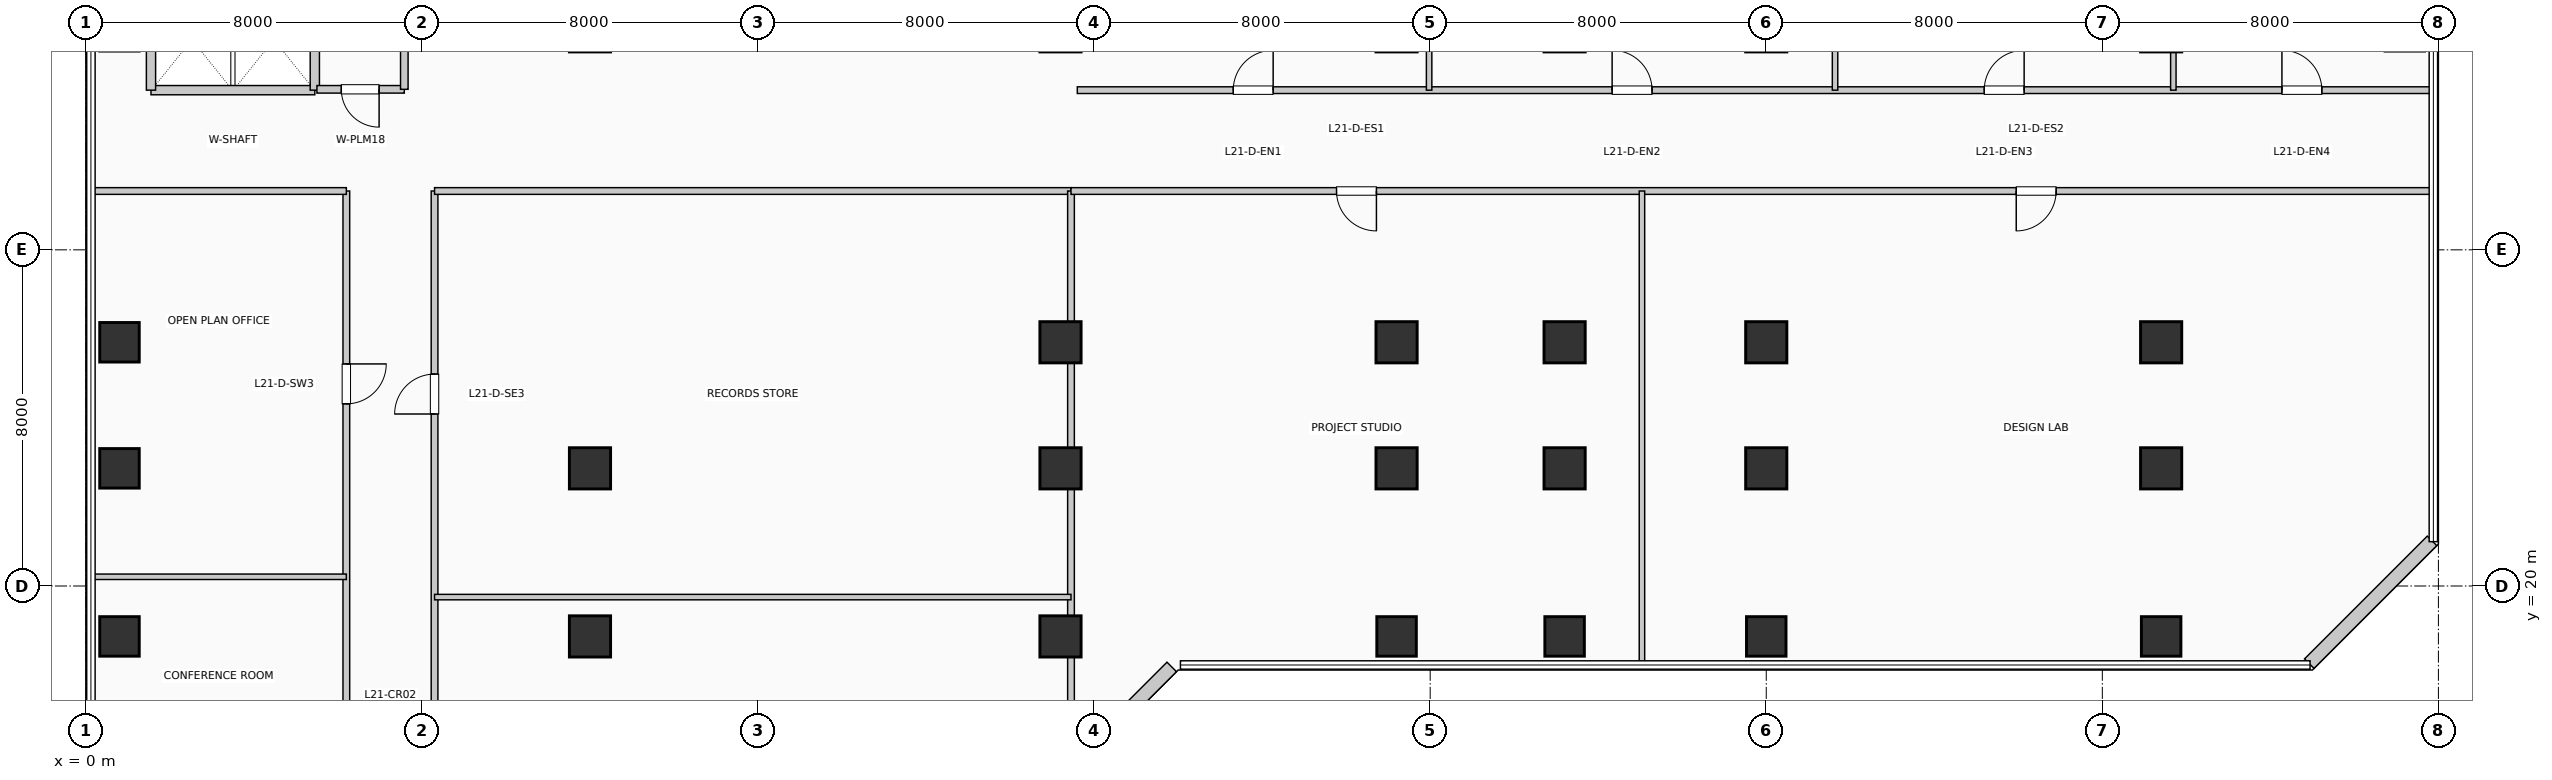
"""IFC4 building model, lengths in metres.
Left out: names, types, materials, properties, quantities, classifications, styles, units other than length and angle.
Written with IfcOpenShell. Run it as: python <this file> out.ifc"""

import sys

from ifc_helpers import new_model, si_unit, direction, frame, frame_2d, origin, origin_2d, place, context, subcontext, project, spatial, rectangle, extrude, element, fill, save


model = new_model("IFC4")
c1 = context("Model", 3, precision=1e-05, world=origin(), true_north=direction((0.0, 1.0)))
c2 = subcontext(c1, "Body", "Model", "MODEL_VIEW")
j1 = project(units=[si_unit("LENGTHUNIT", "METRE"), si_unit("PLANEANGLEUNIT", "RADIAN")], contexts=[c1])
p1 = place(None, origin())
s1 = spatial("IfcSite", under=j1, at=p1, CompositionType="ELEMENT")
p2 = place(p1, origin())
s2 = spatial("IfcBuilding", under=s1, at=p2, CompositionType="ELEMENT")
p3 = place(p2, frame((0.0, 0.0, 89.76)))
s3 = spatial("IfcBuildingStorey", under=s2, at=p3, CompositionType="ELEMENT", Elevation=89.76)
for number, where, z_axis, x_axis in (
    (1, (0.8, 18.8, 0.0), (0.0, 0.0, 1.0), (1.0, 0.0, 0.0)),
    (2, (0.8, 22.8, 0.0), (0.0, 0.0, 1.0), (1.0, 0.0, 0.0)),
    (3, (0.8, 25.8, 0.0), (0.0, 0.0, 1.0), (1.0, 0.0, 0.0)),
):
    element("IfcColumn", number, at=place(p3, frame(where, z_axis=z_axis, x_axis=x_axis)), inside=s3, PredefinedType="COLUMN", context=c2, shape_type="SweptSolid", body=[
        extrude(rectangle(XDim=0.94, YDim=0.94, at=origin_2d()), origin(), (0.0, 0.0, 1.0), 3.96),
    ])
for number, where, z_axis, x_axis in (
    (4, (12.0, 18.8, 0.0), (0.0, 0.0, 1.0), (1.0, 0.0, 0.0)),
    (5, (12.0, 22.8, 0.0), (0.0, 0.0, 1.0), (1.0, 0.0, 0.0)),
    (6, (23.2, 18.8, 0.0), (0.0, 0.0, 1.0), (1.0, 0.0, 0.0)),
    (7, (23.2, 22.8, 0.0), (0.0, 0.0, 1.0), (1.0, 0.0, 0.0)),
    (8, (23.2, 25.8, 0.0), (0.0, 0.0, 1.0), (1.0, 0.0, 0.0)),
):
    element("IfcColumn", number, at=place(p3, frame(where, z_axis=z_axis, x_axis=x_axis)), inside=s3, PredefinedType="COLUMN", context=c2, shape_type="SweptSolid", body=[
        extrude(rectangle(XDim=0.98, YDim=0.98, at=origin_2d()), origin(), (0.0, 0.0, 1.0), 3.96),
    ])
p4 = place(p3, frame((31.2, 18.8, 0.0), z_axis=(0.0, 0.0, 1.0), x_axis=(1.0, 0.0, 0.0)))
e9 = element("IfcColumn", 9, at=p4, inside=s3, PredefinedType="COLUMN", context=c2, shape_type="SweptSolid", body=[
    extrude(rectangle(XDim=0.94, YDim=0.94, at=origin_2d()), origin(), (0.0, 0.0, 1.0), 3.96),
])
for number, where, z_axis, x_axis in (
    (10, (31.2, 22.8, 0.0), (0.0, 0.0, 1.0), (1.0, 0.0, 0.0)),
    (11, (31.2, 25.8, 0.0), (0.0, 0.0, 1.0), (1.0, 0.0, 0.0)),
):
    element("IfcColumn", number, at=place(p3, frame(where, z_axis=z_axis, x_axis=x_axis)), inside=s3, PredefinedType="COLUMN", context=c2, shape_type="SweptSolid", body=[
        extrude(rectangle(XDim=0.98, YDim=0.98, at=origin_2d()), origin(), (0.0, 0.0, 1.0), 3.96),
    ])
p5 = place(p3, frame((35.2, 18.8, 0.0), z_axis=(0.0, 0.0, 1.0), x_axis=(1.0, 0.0, 0.0)))
e12 = element("IfcColumn", 12, at=p5, inside=s3, PredefinedType="COLUMN", context=c2, shape_type="SweptSolid", body=[
    extrude(rectangle(XDim=0.94, YDim=0.94, at=origin_2d()), origin(), (0.0, 0.0, 1.0), 3.96),
])
for number, where, z_axis, x_axis in (
    (13, (35.2, 22.8, 0.0), (0.0, 0.0, 1.0), (1.0, 0.0, 0.0)),
    (14, (35.2, 25.8, 0.0), (0.0, 0.0, 1.0), (1.0, 0.0, 0.0)),
):
    element("IfcColumn", number, at=place(p3, frame(where, z_axis=z_axis, x_axis=x_axis)), inside=s3, PredefinedType="COLUMN", context=c2, shape_type="SweptSolid", body=[
        extrude(rectangle(XDim=0.98, YDim=0.98, at=origin_2d()), origin(), (0.0, 0.0, 1.0), 3.96),
    ])
p6 = place(p3, frame((40.0, 18.8, 0.0), z_axis=(0.0, 0.0, 1.0), x_axis=(1.0, 0.0, 0.0)))
e15 = element("IfcColumn", 15, at=p6, inside=s3, PredefinedType="COLUMN", context=c2, shape_type="SweptSolid", body=[
    extrude(rectangle(XDim=0.94, YDim=0.94, at=origin_2d()), origin(), (0.0, 0.0, 1.0), 3.96),
])
for number, where, z_axis, x_axis in (
    (16, (40.0, 22.8, 0.0), (0.0, 0.0, 1.0), (1.0, 0.0, 0.0)),
    (17, (40.0, 25.8, 0.0), (0.0, 0.0, 1.0), (1.0, 0.0, 0.0)),
):
    element("IfcColumn", number, at=place(p3, frame(where, z_axis=z_axis, x_axis=x_axis)), inside=s3, PredefinedType="COLUMN", context=c2, shape_type="SweptSolid", body=[
        extrude(rectangle(XDim=0.98, YDim=0.98, at=origin_2d()), origin(), (0.0, 0.0, 1.0), 3.96),
    ])
p7 = place(p3, frame((49.4, 18.8, 0.0), z_axis=(0.0, 0.0, 1.0), x_axis=(1.0, 0.0, 0.0)))
e18 = element("IfcColumn", 18, at=p7, inside=s3, PredefinedType="COLUMN", context=c2, shape_type="SweptSolid", body=[
    extrude(rectangle(XDim=0.94, YDim=0.94, at=origin_2d()), origin(), (0.0, 0.0, 1.0), 3.96),
])
for number, where, z_axis, x_axis in (
    (19, (49.4, 22.8, 0.0), (0.0, 0.0, 1.0), (1.0, 0.0, 0.0)),
    (20, (49.4, 25.8, 0.0), (0.0, 0.0, 1.0), (1.0, 0.0, 0.0)),
):
    element("IfcColumn", number, at=place(p3, frame(where, z_axis=z_axis, x_axis=x_axis)), inside=s3, PredefinedType="COLUMN", context=c2, shape_type="SweptSolid", body=[
        extrude(rectangle(XDim=0.98, YDim=0.98, at=origin_2d()), origin(), (0.0, 0.0, 1.0), 3.96),
    ])
p8 = place(p3, frame((23.926, 16.152, 0.0), z_axis=(0.0, 0.0, 1.0), x_axis=(0.707106781187, 0.707106781187, 0.0)))
e21 = element("IfcWall", 21, at=p8, inside=s3, PredefinedType="SOLIDWALL", context=c2, shape_type="SweptSolid", body=[
    extrude(rectangle(XDim=2.718, YDim=0.32, at=frame_2d((1.359, 0.0))), origin(), (0.0, 0.0, 1.0), 3.61),
])
p9 = place(p3, frame((52.926, 18.152, 0.0), z_axis=(0.0, 0.0, 1.0), x_axis=(0.707106781187, 0.707106781187, 0.0)))
e22 = element("IfcWall", 22, at=p9, inside=s3, PredefinedType="SOLIDWALL", context=c2, shape_type="SweptSolid", body=[
    extrude(rectangle(XDim=4.133, YDim=0.32, at=frame_2d((2.066, 0.0))), origin(), (0.0, 0.0, 1.0), 3.61),
])
p10 = place(p3, frame((1.55, 31.8, 0.0), z_axis=(0.0, 0.0, 1.0), x_axis=(1.0, 0.0, 0.0)))
e23 = element("IfcWall", 23, at=p10, inside=s3, PredefinedType="PARTITIONING", context=c2, shape_type="SweptSolid", body=[
    extrude(rectangle(XDim=3.9, YDim=0.22, at=frame_2d((1.95, 0.0))), origin(), (0.0, 0.0, 1.0), 3.61),
])
for number, where, z_axis, x_axis in (
    (24, (1.55, 31.8, 0.0), (0.0, 0.0, 1.0), (0.0, 1.0, 0.0)),
    (25, (5.45, 31.8, 0.0), (0.0, 0.0, 1.0), (0.0, 1.0, 0.0)),
):
    element("IfcWall", number, at=place(p3, frame(where, z_axis=z_axis, x_axis=x_axis)), inside=s3, PredefinedType="PARTITIONING", context=c2, shape_type="SweptSolid", body=[
        extrude(rectangle(XDim=2.38, YDim=0.22, at=frame_2d((1.19, 0.0))), origin(), (0.0, 0.0, 1.0), 3.61),
    ])
p11 = place(p3, frame((5.5, 31.82, 0.0), z_axis=(0.0, 0.0, 1.0), x_axis=(1.0, 0.0, 0.0)))
e26 = element("IfcWall", 26, at=p11, inside=s3, PredefinedType="PLUMBINGWALL", context=c2, shape_type="SweptSolid", body=[
    extrude(rectangle(XDim=2.08, YDim=0.18, at=frame_2d((1.04, 0.0))), origin(), (0.0, 0.0, 1.0), 3.61),
])
p12 = place(p11, frame((1.48, 0.0, 0.0), z_axis=(0.0, 0.0, 1.0), x_axis=(-1.0, 0.0, 0.0)))
e27 = element("IfcOpeningElement", 27, at=p12, cuts=e26, PredefinedType="OPENING", context=c2, shape_type="SweptSolid", body=[
    extrude(rectangle(XDim=0.9, YDim=2.1, at=frame_2d((0.45, 1.05))), frame((0.0, 0.1, 0.0), z_axis=(0.0, -1.0, 0.0), x_axis=(1.0, 0.0, 0.0)), (0.0, 0.0, 1.0), 0.2),
])
p13 = place(p3, frame((7.58, 31.82, 0.0), z_axis=(0.0, 0.0, 1.0), x_axis=(0.0, 1.0, 0.0)))
e28 = element("IfcWall", 28, at=p13, inside=s3, PredefinedType="PLUMBINGWALL", context=c2, shape_type="SweptSolid", body=[
    extrude(rectangle(XDim=2.36, YDim=0.18, at=frame_2d((1.18, 0.0))), origin(), (0.0, 0.0, 1.0), 3.61),
])
p14 = place(p3, frame((6.2, 5.24, 0.0), z_axis=(0.0, 0.0, 1.0), x_axis=(0.0, 1.0, 0.0)))
e29 = element("IfcWall", 29, at=p14, inside=s3, PredefinedType="PARTITIONING", context=c2, shape_type="SweptSolid", body=[
    extrude(rectangle(XDim=24.16, YDim=0.16, at=frame_2d((12.08, 0.0))), origin(), (0.0, 0.0, 1.0), 3.61),
])
p15 = place(p14, frame((4.099, 0.0, 0.0), z_axis=(0.0, 0.0, 1.0), x_axis=(-1.0, 0.0, 0.0)))
e30 = element("IfcOpeningElement", 30, at=p15, cuts=e29, PredefinedType="OPENING", context=c2, shape_type="SweptSolid", body=[
    extrude(rectangle(XDim=0.95, YDim=2.15, at=frame_2d((0.475, 1.075))), frame((0.0, 0.09, 0.0), z_axis=(0.0, -1.0, 0.0), x_axis=(1.0, 0.0, 0.0)), (0.0, 0.0, 1.0), 0.18),
])
p16 = place(p14, frame((11.589, 0.0, 0.0), z_axis=(0.0, 0.0, 1.0), x_axis=(-1.0, 0.0, 0.0)))
e31 = element("IfcOpeningElement", 31, at=p16, cuts=e29, PredefinedType="OPENING", context=c2, shape_type="SweptSolid", body=[
    extrude(rectangle(XDim=0.95, YDim=2.15, at=frame_2d((0.475, 1.075))), frame((0.0, 0.09, 0.0), z_axis=(0.0, -1.0, 0.0), x_axis=(1.0, 0.0, 0.0)), (0.0, 0.0, 1.0), 0.18),
])
p17 = place(p14, frame((20.044, 0.0, 0.0), z_axis=(0.0, 0.0, 1.0), x_axis=(-1.0, 0.0, 0.0)))
e32 = element("IfcOpeningElement", 32, at=p17, cuts=e29, PredefinedType="OPENING", context=c2, shape_type="SweptSolid", body=[
    extrude(rectangle(XDim=0.95, YDim=2.15, at=frame_2d((0.475, 1.075))), frame((0.0, 0.09, 0.0), z_axis=(0.0, -1.0, 0.0), x_axis=(1.0, 0.0, 0.0)), (0.0, 0.0, 1.0), 0.18),
])
p18 = place(p3, frame((8.3, 5.24, 0.0), z_axis=(0.0, 0.0, 1.0), x_axis=(0.0, 1.0, 0.0)))
e33 = element("IfcWall", 33, at=p18, inside=s3, PredefinedType="PARTITIONING", context=c2, shape_type="SweptSolid", body=[
    extrude(rectangle(XDim=24.16, YDim=0.16, at=frame_2d((12.08, 0.0))), origin(), (0.0, 0.0, 1.0), 3.61),
])
p19 = place(p18, frame((2.907, 0.0, 0.0)))
e34 = element("IfcOpeningElement", 34, at=p19, cuts=e33, PredefinedType="OPENING", context=c2, shape_type="SweptSolid", body=[
    extrude(rectangle(XDim=0.95, YDim=2.15, at=frame_2d((0.475, 1.075))), frame((0.0, 0.09, 0.0), z_axis=(0.0, -1.0, 0.0), x_axis=(1.0, 0.0, 0.0)), (0.0, 0.0, 1.0), 0.18),
])
p20 = place(p18, frame((10.156, 0.0, 0.0)))
e35 = element("IfcOpeningElement", 35, at=p20, cuts=e33, PredefinedType="OPENING", context=c2, shape_type="SweptSolid", body=[
    extrude(rectangle(XDim=0.95, YDim=2.15, at=frame_2d((0.475, 1.075))), frame((0.0, 0.09, 0.0), z_axis=(0.0, -1.0, 0.0), x_axis=(1.0, 0.0, 0.0)), (0.0, 0.0, 1.0), 0.18),
])
p21 = place(p18, frame((18.853, 0.0, 0.0)))
e36 = element("IfcOpeningElement", 36, at=p21, cuts=e33, PredefinedType="OPENING", context=c2, shape_type="SweptSolid", body=[
    extrude(rectangle(XDim=0.95, YDim=2.15, at=frame_2d((0.475, 1.075))), frame((0.0, 0.09, 0.0), z_axis=(0.0, -1.0, 0.0), x_axis=(1.0, 0.0, 0.0)), (0.0, 0.0, 1.0), 0.18),
])
p22 = place(p3, frame((0.19, 29.4, 0.0), z_axis=(0.0, 0.0, 1.0), x_axis=(1.0, 0.0, 0.0)))
e37 = element("IfcWall", 37, at=p22, inside=s3, PredefinedType="PARTITIONING", context=c2, shape_type="SweptSolid", body=[
    extrude(rectangle(XDim=6.01, YDim=0.16, at=frame_2d((3.005, 0.0))), origin(), (0.0, 0.0, 1.0), 3.265),
])
p23 = place(p3, frame((8.3, 29.4, 0.0), z_axis=(0.0, 0.0, 1.0), x_axis=(1.0, 0.0, 0.0)))
e38 = element("IfcWall", 38, at=p23, inside=s3, PredefinedType="PARTITIONING", context=c2, shape_type="SweptSolid", body=[
    extrude(rectangle(XDim=15.15, YDim=0.16, at=frame_2d((7.575, 0.0))), origin(), (0.0, 0.0, 1.0), 3.265),
])
p24 = place(p3, frame((23.45, 1.04, 0.0), z_axis=(0.0, 0.0, 1.0), x_axis=(0.0, 1.0, 0.0)))
e39 = element("IfcWall", 39, at=p24, inside=s3, PredefinedType="PARTITIONING", context=c2, shape_type="SweptSolid", body=[
    extrude(rectangle(XDim=28.36, YDim=0.16, at=frame_2d((14.18, 0.0))), origin(), (0.0, 0.0, 1.0), 2.895),
])
p25 = place(p3, frame((0.19, 20.219, 0.0), z_axis=(0.0, 0.0, 1.0), x_axis=(1.0, 0.0, 0.0)))
e40 = element("IfcWall", 40, at=p25, inside=s3, PredefinedType="PARTITIONING", context=c2, shape_type="SweptSolid", body=[
    extrude(rectangle(XDim=6.01, YDim=0.13, at=frame_2d((3.005, 0.0))), origin(), (0.0, 0.0, 1.0), 3.61),
])
p26 = place(p3, frame((8.3, 19.736, 0.0), z_axis=(0.0, 0.0, 1.0), x_axis=(1.0, 0.0, 0.0)))
e41 = element("IfcWall", 41, at=p26, inside=s3, PredefinedType="PARTITIONING", context=c2, shape_type="SweptSolid", body=[
    extrude(rectangle(XDim=15.15, YDim=0.13, at=frame_2d((7.575, 0.0))), origin(), (0.0, 0.0, 1.0), 3.61),
])
p27 = place(p3, frame((23.45, 29.4, 0.0), z_axis=(0.0, 0.0, 1.0), x_axis=(1.0, 0.0, 0.0)))
e42 = element("IfcWall", 42, at=p27, inside=s3, PredefinedType="PARTITIONING", context=c2, shape_type="SweptSolid", body=[
    extrude(rectangle(XDim=32.36, YDim=0.16, at=frame_2d((16.18, 0.0))), origin(), (0.0, 0.0, 1.0), 3.265),
])
p28 = place(p27, frame((7.271, 0.0, 0.0), z_axis=(0.0, 0.0, 1.0), x_axis=(-1.0, 0.0, 0.0)))
e43 = element("IfcOpeningElement", 43, at=p28, cuts=e42, PredefinedType="OPENING", context=c2, shape_type="SweptSolid", body=[
    extrude(rectangle(XDim=0.95, YDim=2.15, at=frame_2d((0.475, 1.075))), frame((0.0, 0.09, 0.0), z_axis=(0.0, -1.0, 0.0), x_axis=(1.0, 0.0, 0.0)), (0.0, 0.0, 1.0), 0.18),
])
p29 = place(p27, frame((23.45, 0.0, 0.0), z_axis=(0.0, 0.0, 1.0), x_axis=(-1.0, 0.0, 0.0)))
e44 = element("IfcOpeningElement", 44, at=p29, cuts=e42, PredefinedType="OPENING", context=c2, shape_type="SweptSolid", body=[
    extrude(rectangle(XDim=0.95, YDim=2.15, at=frame_2d((0.475, 1.075))), frame((0.0, 0.09, 0.0), z_axis=(0.0, -1.0, 0.0), x_axis=(1.0, 0.0, 0.0)), (0.0, 0.0, 1.0), 0.18),
])
p30 = place(p3, frame((23.6, 31.8, 0.0), z_axis=(0.0, 0.0, 1.0), x_axis=(1.0, 0.0, 0.0)))
e45 = element("IfcWall", 45, at=p30, inside=s3, PredefinedType="PARTITIONING", context=c2, shape_type="SweptSolid", body=[
    extrude(rectangle(XDim=32.21, YDim=0.16, at=frame_2d((16.105, 0.0))), origin(), (0.0, 0.0, 1.0), 3.61),
])
p31 = place(p30, frame((3.712, 0.0, 0.0)))
e46 = element("IfcOpeningElement", 46, at=p31, cuts=e45, PredefinedType="OPENING", context=c2, shape_type="SweptSolid", body=[
    extrude(rectangle(XDim=0.95, YDim=2.15, at=frame_2d((0.475, 1.075))), frame((0.0, 0.09, 0.0), z_axis=(0.0, -1.0, 0.0), x_axis=(1.0, 0.0, 0.0)), (0.0, 0.0, 1.0), 0.18),
])
p32 = place(p30, frame((12.731, 0.0, 0.0)))
e47 = element("IfcOpeningElement", 47, at=p32, cuts=e45, PredefinedType="OPENING", context=c2, shape_type="SweptSolid", body=[
    extrude(rectangle(XDim=0.95, YDim=2.15, at=frame_2d((0.475, 1.075))), frame((0.0, 0.09, 0.0), z_axis=(0.0, -1.0, 0.0), x_axis=(1.0, 0.0, 0.0)), (0.0, 0.0, 1.0), 0.18),
])
p33 = place(p30, frame((21.589, 0.0, 0.0)))
e48 = element("IfcOpeningElement", 48, at=p33, cuts=e45, PredefinedType="OPENING", context=c2, shape_type="SweptSolid", body=[
    extrude(rectangle(XDim=0.95, YDim=2.15, at=frame_2d((0.475, 1.075))), frame((0.0, 0.09, 0.0), z_axis=(0.0, -1.0, 0.0), x_axis=(1.0, 0.0, 0.0)), (0.0, 0.0, 1.0), 0.18),
])
p34 = place(p30, frame((28.675, 0.0, 0.0)))
e49 = element("IfcOpeningElement", 49, at=p34, cuts=e45, PredefinedType="OPENING", context=c2, shape_type="SweptSolid", body=[
    extrude(rectangle(XDim=0.95, YDim=2.15, at=frame_2d((0.475, 1.075))), frame((0.0, 0.09, 0.0), z_axis=(0.0, -1.0, 0.0), x_axis=(1.0, 0.0, 0.0)), (0.0, 0.0, 1.0), 0.18),
])
p35 = place(p3, frame((37.041, 18.19, 0.0), z_axis=(0.0, 0.0, 1.0), x_axis=(0.0, 1.0, 0.0)))
e50 = element("IfcWall", 50, at=p35, inside=s3, PredefinedType="PARTITIONING", context=c2, shape_type="SweptSolid", body=[
    extrude(rectangle(XDim=11.21, YDim=0.13, at=frame_2d((5.605, 0.0))), origin(), (0.0, 0.0, 1.0), 3.61),
])
for number, where, z_axis, x_axis in (
    (51, (31.975, 31.8, 0.0), (0.0, 0.0, 1.0), (0.0, 1.0, 0.0)),
    (52, (41.638, 31.8, 0.0), (0.0, 0.0, 1.0), (0.0, 1.0, 0.0)),
):
    element("IfcWall", number, at=place(p3, frame(where, z_axis=z_axis, x_axis=x_axis)), inside=s3, PredefinedType="PARTITIONING", context=c2, shape_type="SweptSolid", body=[
        extrude(rectangle(XDim=14.01, YDim=0.13, at=frame_2d((7.005, 0.0))), origin(), (0.0, 0.0, 1.0), 3.61),
    ])
p36 = place(p3, frame((49.69, 31.8, 0.0), z_axis=(0.0, 0.0, 1.0), x_axis=(0.0, 1.0, 0.0)))
e53 = element("IfcWall", 53, at=p36, inside=s3, PredefinedType="PARTITIONING", context=c2, shape_type="SweptSolid", body=[
    extrude(rectangle(XDim=14.01, YDim=0.13, at=frame_2d((7.005, 0.0))), origin(), (0.0, 0.0, 1.0), 2.895),
])
p37 = place(p12, origin())
e54 = element("IfcDoor", 54, at=p37, inside=s3, OperationType="SINGLE_SWING_RIGHT", PredefinedType="DOOR", context=c2, shape_type="SweptSolid", body=[
    extrude(rectangle(XDim=0.9, YDim=2.1, at=frame_2d((0.45, 1.05))), frame((0.0, 0.025, 0.0), z_axis=(0.0, -1.0, 0.0), x_axis=(1.0, 0.0, 0.0)), (0.0, 0.0, 1.0), 0.05),
])
fill(e27, e54)
p38 = place(p17, origin())
e55 = element("IfcDoor", 55, at=p38, inside=s3, OperationType="SINGLE_SWING_RIGHT", PredefinedType="DOOR", context=c2, shape_type="SweptSolid", body=[
    extrude(rectangle(XDim=0.95, YDim=2.15, at=frame_2d((0.475, 1.075))), frame((0.0, 0.025, 0.0), z_axis=(0.0, -1.0, 0.0), x_axis=(1.0, 0.0, 0.0)), (0.0, 0.0, 1.0), 0.05),
])
fill(e32, e55)
p39 = place(p21, origin())
e56 = element("IfcDoor", 56, at=p39, inside=s3, OperationType="SINGLE_SWING_LEFT", PredefinedType="DOOR", context=c2, shape_type="SweptSolid", body=[
    extrude(rectangle(XDim=0.95, YDim=2.15, at=frame_2d((0.475, 1.075))), frame((0.0, 0.025, 0.0), z_axis=(0.0, -1.0, 0.0), x_axis=(1.0, 0.0, 0.0)), (0.0, 0.0, 1.0), 0.05),
])
fill(e36, e56)
p40 = place(p28, origin())
e57 = element("IfcDoor", 57, at=p40, inside=s3, OperationType="SINGLE_SWING_RIGHT", PredefinedType="DOOR", context=c2, shape_type="SweptSolid", body=[
    extrude(rectangle(XDim=0.95, YDim=2.15, at=frame_2d((0.475, 1.075))), frame((0.0, 0.025, 0.0), z_axis=(0.0, -1.0, 0.0), x_axis=(1.0, 0.0, 0.0)), (0.0, 0.0, 1.0), 0.05),
])
fill(e43, e57)
p41 = place(p29, origin())
e58 = element("IfcDoor", 58, at=p41, inside=s3, OperationType="SINGLE_SWING_LEFT", PredefinedType="DOOR", context=c2, shape_type="SweptSolid", body=[
    extrude(rectangle(XDim=0.95, YDim=2.15, at=frame_2d((0.475, 1.075))), frame((0.0, 0.025, 0.0), z_axis=(0.0, -1.0, 0.0), x_axis=(1.0, 0.0, 0.0)), (0.0, 0.0, 1.0), 0.05),
])
fill(e44, e58)
p42 = place(p31, origin())
e59 = element("IfcDoor", 59, at=p42, inside=s3, OperationType="SINGLE_SWING_RIGHT", PredefinedType="DOOR", context=c2, shape_type="SweptSolid", body=[
    extrude(rectangle(XDim=0.95, YDim=2.15, at=frame_2d((0.475, 1.075))), frame((0.0, 0.025, 0.0), z_axis=(0.0, -1.0, 0.0), x_axis=(1.0, 0.0, 0.0)), (0.0, 0.0, 1.0), 0.05),
])
fill(e46, e59)
p43 = place(p32, origin())
e60 = element("IfcDoor", 60, at=p43, inside=s3, OperationType="SINGLE_SWING_LEFT", PredefinedType="DOOR", context=c2, shape_type="SweptSolid", body=[
    extrude(rectangle(XDim=0.95, YDim=2.15, at=frame_2d((0.475, 1.075))), frame((0.0, 0.025, 0.0), z_axis=(0.0, -1.0, 0.0), x_axis=(1.0, 0.0, 0.0)), (0.0, 0.0, 1.0), 0.05),
])
fill(e47, e60)
p44 = place(p33, origin())
e61 = element("IfcDoor", 61, at=p44, inside=s3, OperationType="SINGLE_SWING_RIGHT", PredefinedType="DOOR", context=c2, shape_type="SweptSolid", body=[
    extrude(rectangle(XDim=0.95, YDim=2.15, at=frame_2d((0.475, 1.075))), frame((0.0, 0.025, 0.0), z_axis=(0.0, -1.0, 0.0), x_axis=(1.0, 0.0, 0.0)), (0.0, 0.0, 1.0), 0.05),
])
fill(e48, e61)
p45 = place(p34, origin())
e62 = element("IfcDoor", 62, at=p45, inside=s3, OperationType="SINGLE_SWING_LEFT", PredefinedType="DOOR", context=c2, shape_type="SweptSolid", body=[
    extrude(rectangle(XDim=0.95, YDim=2.15, at=frame_2d((0.475, 1.075))), frame((0.0, 0.025, 0.0), z_axis=(0.0, -1.0, 0.0), x_axis=(1.0, 0.0, 0.0)), (0.0, 0.0, 1.0), 0.05),
])
fill(e49, e62)
save(model, sys.argv[1])
